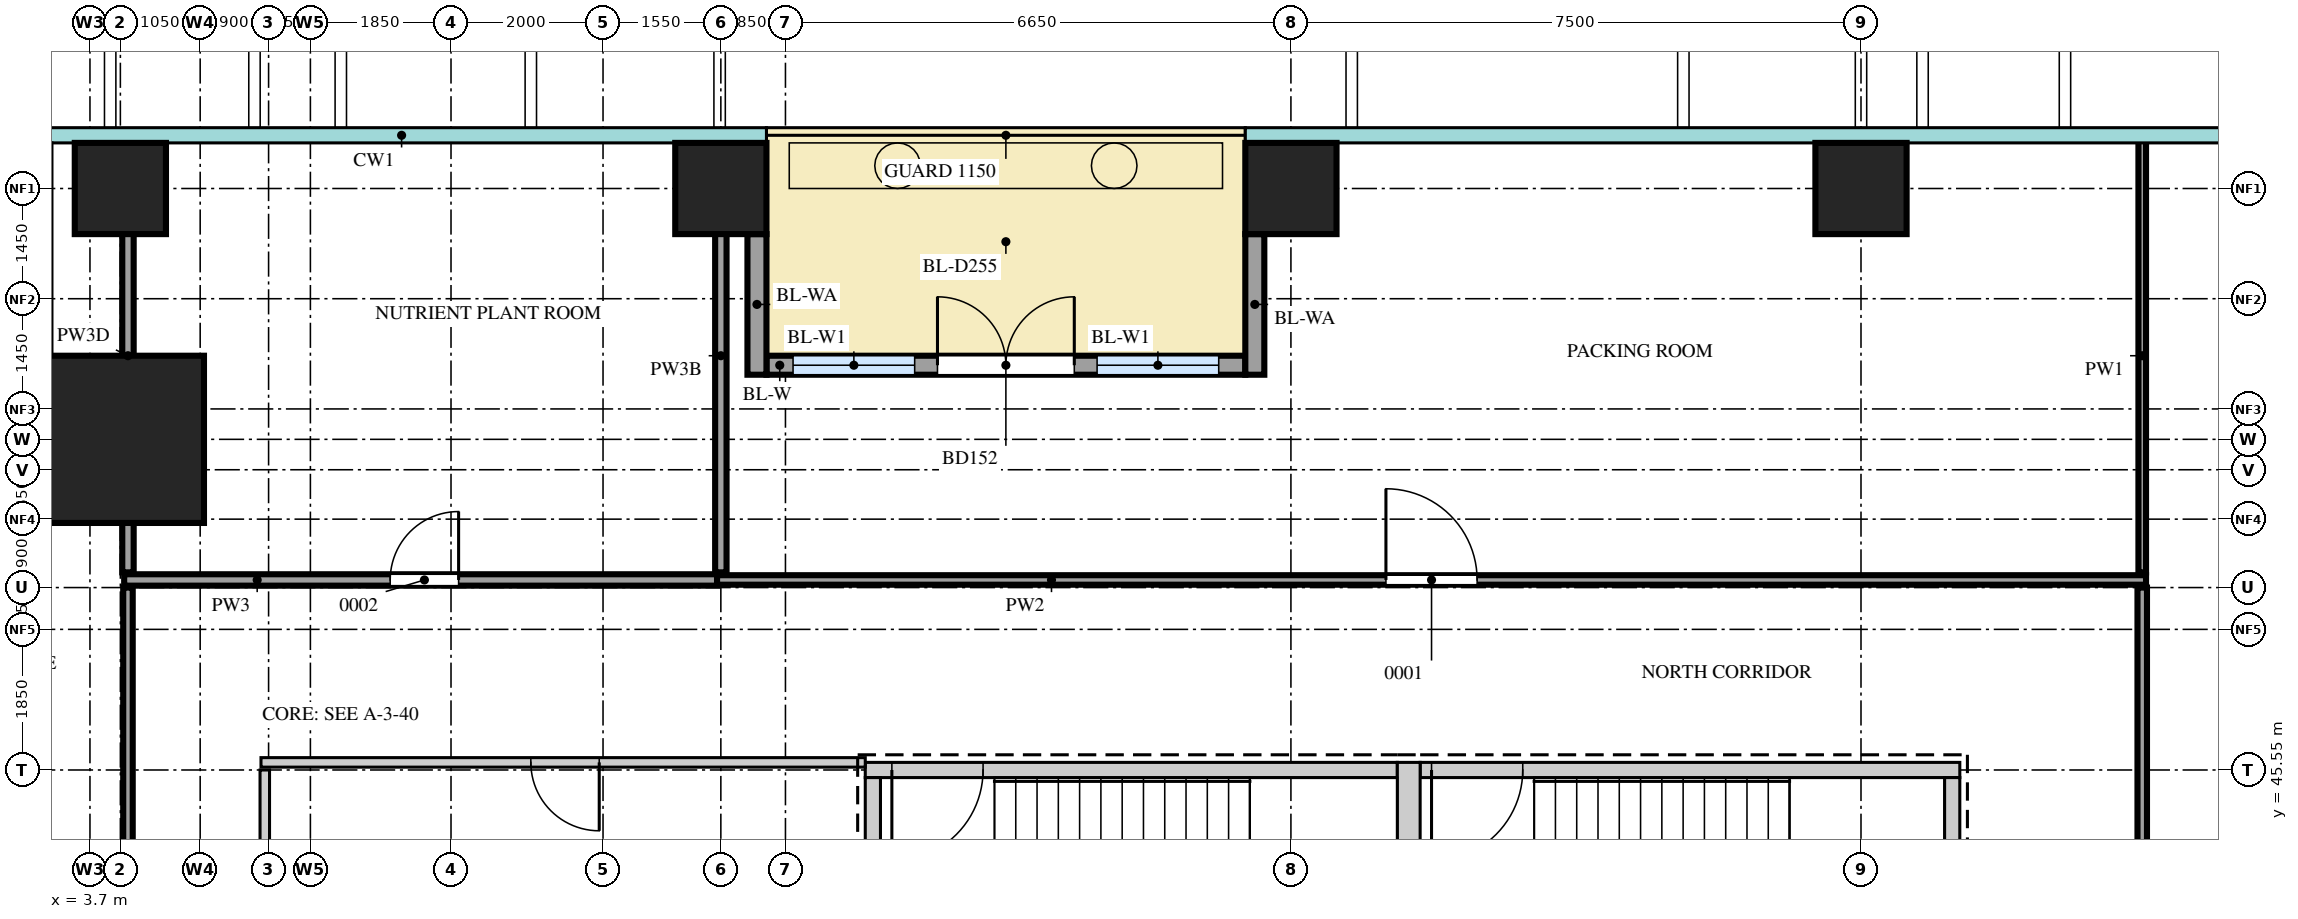
"""IFC4 building model, lengths in metres.
Left out: names, types, materials, properties, quantities, classifications, styles, units other than length and angle.
Written with IfcOpenShell. Run it as: python <this file> out.ifc"""

import sys

from ifc_helpers import new_model, si_unit, direction, frame, frame_2d, origin, origin_2d, place, context, subcontext, project, spatial, rectangle, extrude, source, transform, mapped, element, fill, save


model = new_model("IFC4")
c1 = context("Model", 3, precision=1e-05, world=origin(), true_north=direction((0.0, 1.0)))
c2 = subcontext(c1, "Body", "Model", "MODEL_VIEW")
j1 = project(units=[si_unit("LENGTHUNIT", "METRE"), si_unit("PLANEANGLEUNIT", "RADIAN")], contexts=[c1])
p1 = place(None, origin())
s1 = spatial("IfcSite", under=j1, at=p1, CompositionType="ELEMENT")
p2 = place(p1, origin())
s2 = spatial("IfcBuilding", under=s1, at=p2, CompositionType="ELEMENT")
p3 = place(p2, frame((0.0, 0.0, 73.5)))
s3 = spatial("IfcBuildingStorey", under=s2, at=p3, CompositionType="ELEMENT", Elevation=73.5)
m1 = source(origin(), c2, "Body", "SweptSolid", [
    extrude(rectangle(XDim=7.0, YDim=0.2, at=frame_2d((3.5, 0.0))), origin(), (0.0, 0.0, 1.0), 4.2),
])
p4 = place(p3, frame((13.9, 45.55, 0.0), z_axis=(0.0, 0.0, 1.0), x_axis=(1.0, 0.0, 0.0)))
e1 = element("IfcWall", 1, at=p4, inside=s3, PredefinedType="SHEAR", context=c2, shape_type="MappedRepresentation", body=[
    mapped(m1, transform((0.0, 0.0, 0.0))),
])
m2 = source(origin(), c2, "Body", "SweptSolid", [
    extrude(rectangle(XDim=1.2, YDim=2.1, at=frame_2d((0.6, 1.05))), frame((0.0, 0.11, 0.0), z_axis=(0.0, -1.0, 0.0), x_axis=(1.0, 0.0, 0.0)), (0.0, 0.0, 1.0), 0.22),
])
p5 = place(p4, frame((0.35, 0.0, 0.0)))
e2 = element("IfcOpeningElement", 2, at=p5, cuts=e1, PredefinedType="OPENING", context=c2, shape_type="MappedRepresentation", body=[
    mapped(m2, transform((0.0, 0.0, 0.0))),
])
m3 = source(origin(), c2, "Body", "SweptSolid", [
    extrude(rectangle(XDim=7.1, YDim=0.2, at=frame_2d((3.55, 0.0))), origin(), (0.0, 0.0, 1.0), 4.2),
])
p6 = place(p3, frame((21.2, 45.55, 0.0), z_axis=(0.0, 0.0, 1.0), x_axis=(1.0, 0.0, 0.0)))
e3 = element("IfcWall", 3, at=p6, inside=s3, PredefinedType="SHEAR", context=c2, shape_type="MappedRepresentation", body=[
    mapped(m3, transform((0.0, 0.0, 0.0))),
])
p7 = place(p6, frame((0.15, 0.0, 0.0)))
e4 = element("IfcOpeningElement", 4, at=p7, cuts=e3, PredefinedType="OPENING", context=c2, shape_type="MappedRepresentation", body=[
    mapped(m2, transform((0.0, 0.0, 0.0))),
])
m4 = source(origin(), c2, "Body", "SweptSolid", [
    extrude(rectangle(XDim=3.75, YDim=0.3, at=frame_2d((1.875, 0.0))), origin(), (0.0, 0.0, 1.0), 4.2),
])
p8 = place(p3, frame((21.05, 41.9, 0.0), z_axis=(0.0, 0.0, 1.0), x_axis=(0.0, 1.0, 0.0)))
e5 = element("IfcWall", 5, at=p8, inside=s3, PredefinedType="SHEAR", context=c2, shape_type="MappedRepresentation", body=[
    mapped(m4, transform((0.0, 0.0, 0.0))),
])
m5 = source(origin(), c2, "Body", "SweptSolid", [
    extrude(rectangle(XDim=3.35, YDim=0.2, at=frame_2d((1.675, 0.0))), origin(), (0.0, 0.0, 1.0), 4.2),
])
for number, where, z_axis, x_axis in (
    (6, (14.0, 42.1, 0.0), (0.0, 0.0, 1.0), (0.0, 1.0, 0.0)),
    (7, (28.2, 42.1, 0.0), (0.0, 0.0, 1.0), (0.0, 1.0, 0.0)),
):
    element("IfcWall", number, at=place(p3, frame(where, z_axis=z_axis, x_axis=x_axis)), inside=s3, PredefinedType="SHEAR", context=c2, shape_type="MappedRepresentation", body=[
        mapped(m5, transform((0.0, 0.0, 0.0))),
    ])
m6 = source(origin(), c2, "Body", "SweptSolid", [
    extrude(rectangle(XDim=2.2, YDim=2.2, at=origin_2d()), origin(), (0.0, 0.0, 1.0), 4.5),
])
p9 = place(p3, frame((4.1, 49.9, 0.0), z_axis=(0.0, 0.0, 1.0), x_axis=(1.0, 0.0, 0.0)))
e8 = element("IfcColumn", 8, at=p9, inside=s3, PredefinedType="COLUMN", context=c2, shape_type="MappedRepresentation", body=[
    mapped(m6, transform((0.0, 0.0, 0.0))),
])
m7 = source(origin(), c2, "Body", "SweptSolid", [
    extrude(rectangle(XDim=1.2, YDim=1.2, at=origin_2d()), origin(), (0.0, 0.0, 1.0), 4.2),
])
for number, where, z_axis, x_axis in (
    (9, (4.1, 53.2, 0.0), (0.0, 0.0, 1.0), (1.0, 0.0, 0.0)),
    (10, (12.0, 53.2, 0.0), (0.0, 0.0, 1.0), (1.0, 0.0, 0.0)),
    (11, (19.5, 53.2, 0.0), (0.0, 0.0, 1.0), (1.0, 0.0, 0.0)),
    (12, (27.0, 53.2, 0.0), (0.0, 0.0, 1.0), (1.0, 0.0, 0.0)),
):
    element("IfcColumn", number, at=place(p3, frame(where, z_axis=z_axis, x_axis=x_axis)), inside=s3, PredefinedType="COLUMN", context=c2, shape_type="MappedRepresentation", body=[
        mapped(m7, transform((0.0, 0.0, 0.0))),
    ])
m8 = source(origin(), c2, "Body", "SweptSolid", [
    extrude(rectangle(XDim=6.3, YDim=0.25, at=frame_2d((3.15, 0.0))), origin(), (0.0, 0.0, 1.0), 4.2),
])
p10 = place(p3, frame((12.6, 50.875, 0.0), z_axis=(0.0, 0.0, 1.0), x_axis=(1.0, 0.0, 0.0)))
e13 = element("IfcWall", 13, at=p10, inside=s3, PredefinedType="SOLIDWALL", context=c2, shape_type="MappedRepresentation", body=[
    mapped(m8, transform((0.0, 0.0, 0.0))),
])
m9 = source(origin(), c2, "Body", "SweptSolid", [
    extrude(rectangle(XDim=1.6, YDim=2.4, at=frame_2d((0.8, 1.2))), frame((0.0, 0.135, 0.0), z_axis=(0.0, -1.0, 0.0), x_axis=(1.0, 0.0, 0.0)), (0.0, 0.0, 1.0), 0.27),
])
p11 = place(p10, frame((0.35, 0.0, 0.0)))
e14 = element("IfcOpeningElement", 14, at=p11, cuts=e13, PredefinedType="OPENING", context=c2, shape_type="MappedRepresentation", body=[
    mapped(m9, transform((0.0, 0.0, 0.0))),
])
p12 = place(p10, frame((4.35, 0.0, 0.0)))
e15 = element("IfcOpeningElement", 15, at=p12, cuts=e13, PredefinedType="OPENING", context=c2, shape_type="MappedRepresentation", body=[
    mapped(m9, transform((0.0, 0.0, 0.0))),
])
m10 = source(origin(), c2, "Body", "SweptSolid", [
    extrude(rectangle(XDim=1.8, YDim=2.4, at=frame_2d((0.9, 1.2))), frame((0.0, 0.135, 0.0), z_axis=(0.0, -1.0, 0.0), x_axis=(1.0, 0.0, 0.0)), (0.0, 0.0, 1.0), 0.27),
])
p13 = place(p10, frame((2.25, 0.0, 0.0)))
e16 = element("IfcOpeningElement", 16, at=p13, cuts=e13, PredefinedType="OPENING", context=c2, shape_type="MappedRepresentation", body=[
    mapped(m10, transform((0.0, 0.0, 0.0))),
])
m11 = source(origin(), c2, "Body", "SweptSolid", [
    extrude(rectangle(XDim=1.85, YDim=0.25, at=frame_2d((0.925, 0.0))), origin(), (0.0, 0.0, 1.0), 3.9),
])
for number, where, z_axis, x_axis in (
    (17, (12.475, 52.6, 0.0), (0.0, 0.0, 1.0), (0.0, -1.0, 0.0)),
    (18, (19.025, 52.6, 0.0), (0.0, 0.0, 1.0), (0.0, -1.0, 0.0)),
):
    element("IfcWall", number, at=place(p3, frame(where, z_axis=z_axis, x_axis=x_axis)), inside=s3, PredefinedType="SOLIDWALL", context=c2, shape_type="MappedRepresentation", body=[
        mapped(m11, transform((0.0, 0.0, 0.0))),
    ])
m12 = source(origin(), c2, "Body", "SweptSolid", [
    extrude(rectangle(XDim=41.8, YDim=0.125, at=frame_2d((20.9, 0.0))), origin(), (0.0, 0.0, 1.0), 4.3),
])
p14 = place(p3, frame((4.2, 6.15, 0.0), z_axis=(0.0, 0.0, 1.0), x_axis=(0.0, 1.0, 0.0)))
e19 = element("IfcWall", 19, at=p14, inside=s3, PredefinedType="PARTITIONING", context=c2, shape_type="MappedRepresentation", body=[
    mapped(m12, transform((0.0, 0.0, 0.0))),
])
m13 = source(origin(), c2, "Body", "SweptSolid", [
    extrude(rectangle(XDim=1.2, YDim=2.1, at=frame_2d((0.6, 1.05))), frame((0.0, 0.073, 0.0), z_axis=(0.0, -1.0, 0.0), x_axis=(1.0, 0.0, 0.0)), (0.0, 0.0, 1.0), 0.145),
])
p15 = place(p14, frame((3.45, 0.0, 0.0)))
e20 = element("IfcOpeningElement", 20, at=p15, cuts=e19, PredefinedType="OPENING", context=c2, shape_type="MappedRepresentation", body=[
    mapped(m13, transform((0.0, 0.0, 0.0))),
])
m14 = source(origin(), c2, "Body", "SweptSolid", [
    extrude(rectangle(XDim=0.9, YDim=2.1, at=frame_2d((0.45, 1.05))), frame((0.0, 0.073, 0.0), z_axis=(0.0, -1.0, 0.0), x_axis=(1.0, 0.0, 0.0)), (0.0, 0.0, 1.0), 0.145),
])
p16 = place(p14, frame((13.25, 0.0, 0.0)))
e21 = element("IfcOpeningElement", 21, at=p16, cuts=e19, PredefinedType="OPENING", context=c2, shape_type="MappedRepresentation", body=[
    mapped(m14, transform((0.0, 0.0, 0.0))),
])
p17 = place(p14, frame((30.35, 0.0, 0.0)))
e22 = element("IfcOpeningElement", 22, at=p17, cuts=e19, PredefinedType="OPENING", context=c2, shape_type="MappedRepresentation", body=[
    mapped(m14, transform((0.0, 0.0, 0.0))),
])
m15 = source(origin(), c2, "Body", "SweptSolid", [
    extrude(rectangle(XDim=10.15, YDim=0.125, at=frame_2d((5.075, 0.0))), origin(), (0.0, 0.0, 1.0), 4.3),
])
p18 = place(p3, frame((30.7, 37.8, 0.0), z_axis=(0.0, 0.0, 1.0), x_axis=(0.0, 1.0, 0.0)))
e23 = element("IfcWall", 23, at=p18, inside=s3, PredefinedType="PARTITIONING", context=c2, shape_type="MappedRepresentation", body=[
    mapped(m15, transform((0.0, 0.0, 0.0))),
])
m16 = source(origin(), c2, "Body", "SweptSolid", [
    extrude(rectangle(XDim=3.55, YDim=0.125, at=frame_2d((1.775, 0.0))), origin(), (0.0, 0.0, 1.0), 4.3),
])
p19 = place(p3, frame((6.0, 42.0, 0.0), z_axis=(0.0, 0.0, 1.0), x_axis=(0.0, 1.0, 0.0)))
e24 = element("IfcWall", 24, at=p19, inside=s3, PredefinedType="PARTITIONING", context=c2, shape_type="MappedRepresentation", body=[
    mapped(m16, transform((0.0, 0.0, 0.0))),
])
m17 = source(origin(), c2, "Body", "SweptSolid", [
    extrude(rectangle(XDim=7.95, YDim=0.125, at=frame_2d((3.975, 0.0))), origin(), (0.0, 0.0, 1.0), 4.3),
])
p20 = place(p3, frame((5.95, 45.65, 0.0), z_axis=(0.0, 0.0, 1.0), x_axis=(1.0, 0.0, 0.0)))
e25 = element("IfcWall", 25, at=p20, inside=s3, PredefinedType="PARTITIONING", context=c2, shape_type="MappedRepresentation", body=[
    mapped(m17, transform((0.0, 0.0, 0.0))),
])
p21 = place(p20, frame((3.55, 0.0, 0.0)))
e26 = element("IfcOpeningElement", 26, at=p21, cuts=e25, PredefinedType="OPENING", context=c2, shape_type="MappedRepresentation", body=[
    mapped(m14, transform((0.0, 0.0, 0.0))),
])
m18 = source(origin(), c2, "Body", "SweptSolid", [
    extrude(rectangle(XDim=7.8, YDim=0.15, at=frame_2d((3.9, 0.0))), origin(), (0.0, 0.0, 1.0), 4.3),
])
p22 = place(p3, frame((4.15, 48.05, 0.0), z_axis=(0.0, 0.0, 1.0), x_axis=(1.0, 0.0, 0.0)))
e27 = element("IfcWall", 27, at=p22, inside=s3, PredefinedType="PARTITIONING", context=c2, shape_type="MappedRepresentation", body=[
    mapped(m18, transform((0.0, 0.0, 0.0))),
])
m19 = source(origin(), c2, "Body", "SweptSolid", [
    extrude(rectangle(XDim=0.9, YDim=2.1, at=frame_2d((0.45, 1.05))), frame((0.0, 0.085, 0.0), z_axis=(0.0, -1.0, 0.0), x_axis=(1.0, 0.0, 0.0)), (0.0, 0.0, 1.0), 0.17),
])
p23 = place(p22, frame((3.5, 0.0, 0.0)))
e28 = element("IfcOpeningElement", 28, at=p23, cuts=e27, PredefinedType="OPENING", context=c2, shape_type="MappedRepresentation", body=[
    mapped(m19, transform((0.0, 0.0, 0.0))),
])
m20 = source(origin(), c2, "Body", "SweptSolid", [
    extrude(rectangle(XDim=18.8, YDim=0.125, at=frame_2d((9.4, 0.0))), origin(), (0.0, 0.0, 1.0), 4.3),
])
p24 = place(p3, frame((11.95, 48.05, 0.0), z_axis=(0.0, 0.0, 1.0), x_axis=(1.0, 0.0, 0.0)))
e29 = element("IfcWall", 29, at=p24, inside=s3, PredefinedType="PARTITIONING", context=c2, shape_type="MappedRepresentation", body=[
    mapped(m20, transform((0.0, 0.0, 0.0))),
])
p25 = place(p24, frame((8.8, 0.0, 0.0)))
e30 = element("IfcOpeningElement", 30, at=p25, cuts=e29, PredefinedType="OPENING", context=c2, shape_type="MappedRepresentation", body=[
    mapped(m13, transform((0.0, 0.0, 0.0))),
])
m21 = source(origin(), c2, "Body", "SweptSolid", [
    extrude(rectangle(XDim=5.7, YDim=0.15, at=frame_2d((2.85, 0.0))), origin(), (0.0, 0.0, 1.0), 3.6),
])
p26 = place(p3, frame((4.2, 48.15, 0.0), z_axis=(0.0, 0.0, 1.0), x_axis=(0.0, 1.0, 0.0)))
e31 = element("IfcWall", 31, at=p26, inside=s3, PredefinedType="PARTITIONING", context=c2, shape_type="MappedRepresentation", body=[
    mapped(m21, transform((0.0, 0.0, 0.0))),
])
m22 = source(origin(), c2, "Body", "SweptSolid", [
    extrude(rectangle(XDim=5.7, YDim=0.15, at=frame_2d((2.85, 0.0))), origin(), (0.0, 0.0, 1.0), 3.7),
])
p27 = place(p3, frame((12.0, 48.15, 0.0), z_axis=(0.0, 0.0, 1.0), x_axis=(0.0, 1.0, 0.0)))
e32 = element("IfcWall", 32, at=p27, inside=s3, PredefinedType="PARTITIONING", context=c2, shape_type="MappedRepresentation", body=[
    mapped(m22, transform((0.0, 0.0, 0.0))),
])
m23 = source(origin(), c2, "Body", "SweptSolid", [
    extrude(rectangle(XDim=5.7, YDim=0.1, at=frame_2d((2.85, 0.0))), origin(), (0.0, 0.0, 1.0), 4.3),
])
p28 = place(p3, frame((30.7, 48.15, 0.0), z_axis=(0.0, 0.0, 1.0), x_axis=(0.0, 1.0, 0.0)))
e33 = element("IfcWall", 33, at=p28, inside=s3, PredefinedType="PARTITIONING", context=c2, shape_type="MappedRepresentation", body=[
    mapped(m23, transform((0.0, 0.0, 0.0))),
])
m24 = source(origin(), c2, "Body", "SweptSolid", [
    extrude(rectangle(XDim=1.6, YDim=2.4, at=frame_2d((0.8, 1.2))), frame((0.0, 0.03, 0.0), z_axis=(0.0, -1.0, 0.0), x_axis=(1.0, 0.0, 0.0)), (0.0, 0.0, 1.0), 0.06),
])
p29 = place(p11, origin())
e34 = element("IfcWindow", 34, at=p29, inside=s3, PartitioningType="SINGLE_PANEL", PredefinedType="WINDOW", context=c2, shape_type="MappedRepresentation", body=[
    mapped(m24, transform((0.0, 0.0, 0.0))),
])
fill(e14, e34)
p30 = place(p12, origin())
e35 = element("IfcWindow", 35, at=p30, inside=s3, PartitioningType="SINGLE_PANEL", PredefinedType="WINDOW", context=c2, shape_type="MappedRepresentation", body=[
    mapped(m24, transform((0.0, 0.0, 0.0))),
])
fill(e15, e35)
m25 = source(origin(), c2, "Body", "SweptSolid", [
    extrude(rectangle(XDim=1.8, YDim=2.4, at=frame_2d((0.9, 1.2))), frame((0.0, 0.025, 0.0), z_axis=(0.0, -1.0, 0.0), x_axis=(1.0, 0.0, 0.0)), (0.0, 0.0, 1.0), 0.05),
])
p31 = place(p13, origin())
e36 = element("IfcDoor", 36, at=p31, inside=s3, OperationType="DOUBLE_DOOR_DOUBLE_SWING", PredefinedType="DOOR", context=c2, shape_type="MappedRepresentation", body=[
    mapped(m25, transform((0.0, 0.0, 0.0))),
])
fill(e16, e36)
m26 = source(origin(), c2, "Body", "SweptSolid", [
    extrude(rectangle(XDim=0.9, YDim=2.1, at=frame_2d((0.45, 1.05))), frame((0.0, 0.025, 0.0), z_axis=(0.0, -1.0, 0.0), x_axis=(1.0, 0.0, 0.0)), (0.0, 0.0, 1.0), 0.05),
])
p32 = place(p23, origin())
e37 = element("IfcDoor", 37, at=p32, inside=s3, OperationType="SINGLE_SWING_LEFT", PredefinedType="DOOR", context=c2, shape_type="MappedRepresentation", body=[
    mapped(m26, transform((0.0, 0.0, 0.0))),
])
fill(e28, e37)
m27 = source(origin(), c2, "Body", "SweptSolid", [
    extrude(rectangle(XDim=1.2, YDim=2.1, at=frame_2d((0.6, 1.05))), frame((0.0, 0.025, 0.0), z_axis=(0.0, -1.0, 0.0), x_axis=(1.0, 0.0, 0.0)), (0.0, 0.0, 1.0), 0.05),
])
p33 = place(p25, origin())
e38 = element("IfcDoor", 38, at=p33, inside=s3, OperationType="SINGLE_SWING_RIGHT", PredefinedType="DOOR", context=c2, shape_type="MappedRepresentation", body=[
    mapped(m27, transform((0.0, 0.0, 0.0))),
])
fill(e30, e38)
p34 = place(p21, origin())
e39 = element("IfcDoor", 39, at=p34, inside=s3, OperationType="SINGLE_SWING_RIGHT", PredefinedType="DOOR", context=c2, shape_type="MappedRepresentation", body=[
    mapped(m26, transform((0.0, 0.0, 0.0))),
])
fill(e26, e39)
p35 = place(p5, origin())
e40 = element("IfcDoor", 40, at=p35, inside=s3, OperationType="SINGLE_SWING_LEFT", PredefinedType="DOOR", context=c2, shape_type="MappedRepresentation", body=[
    mapped(m27, transform((0.0, 0.0, 0.0))),
])
fill(e2, e40)
p36 = place(p7, origin())
e41 = element("IfcDoor", 41, at=p36, inside=s3, OperationType="SINGLE_SWING_LEFT", PredefinedType="DOOR", context=c2, shape_type="MappedRepresentation", body=[
    mapped(m27, transform((0.0, 0.0, 0.0))),
])
fill(e4, e41)
save(model, sys.argv[1])
